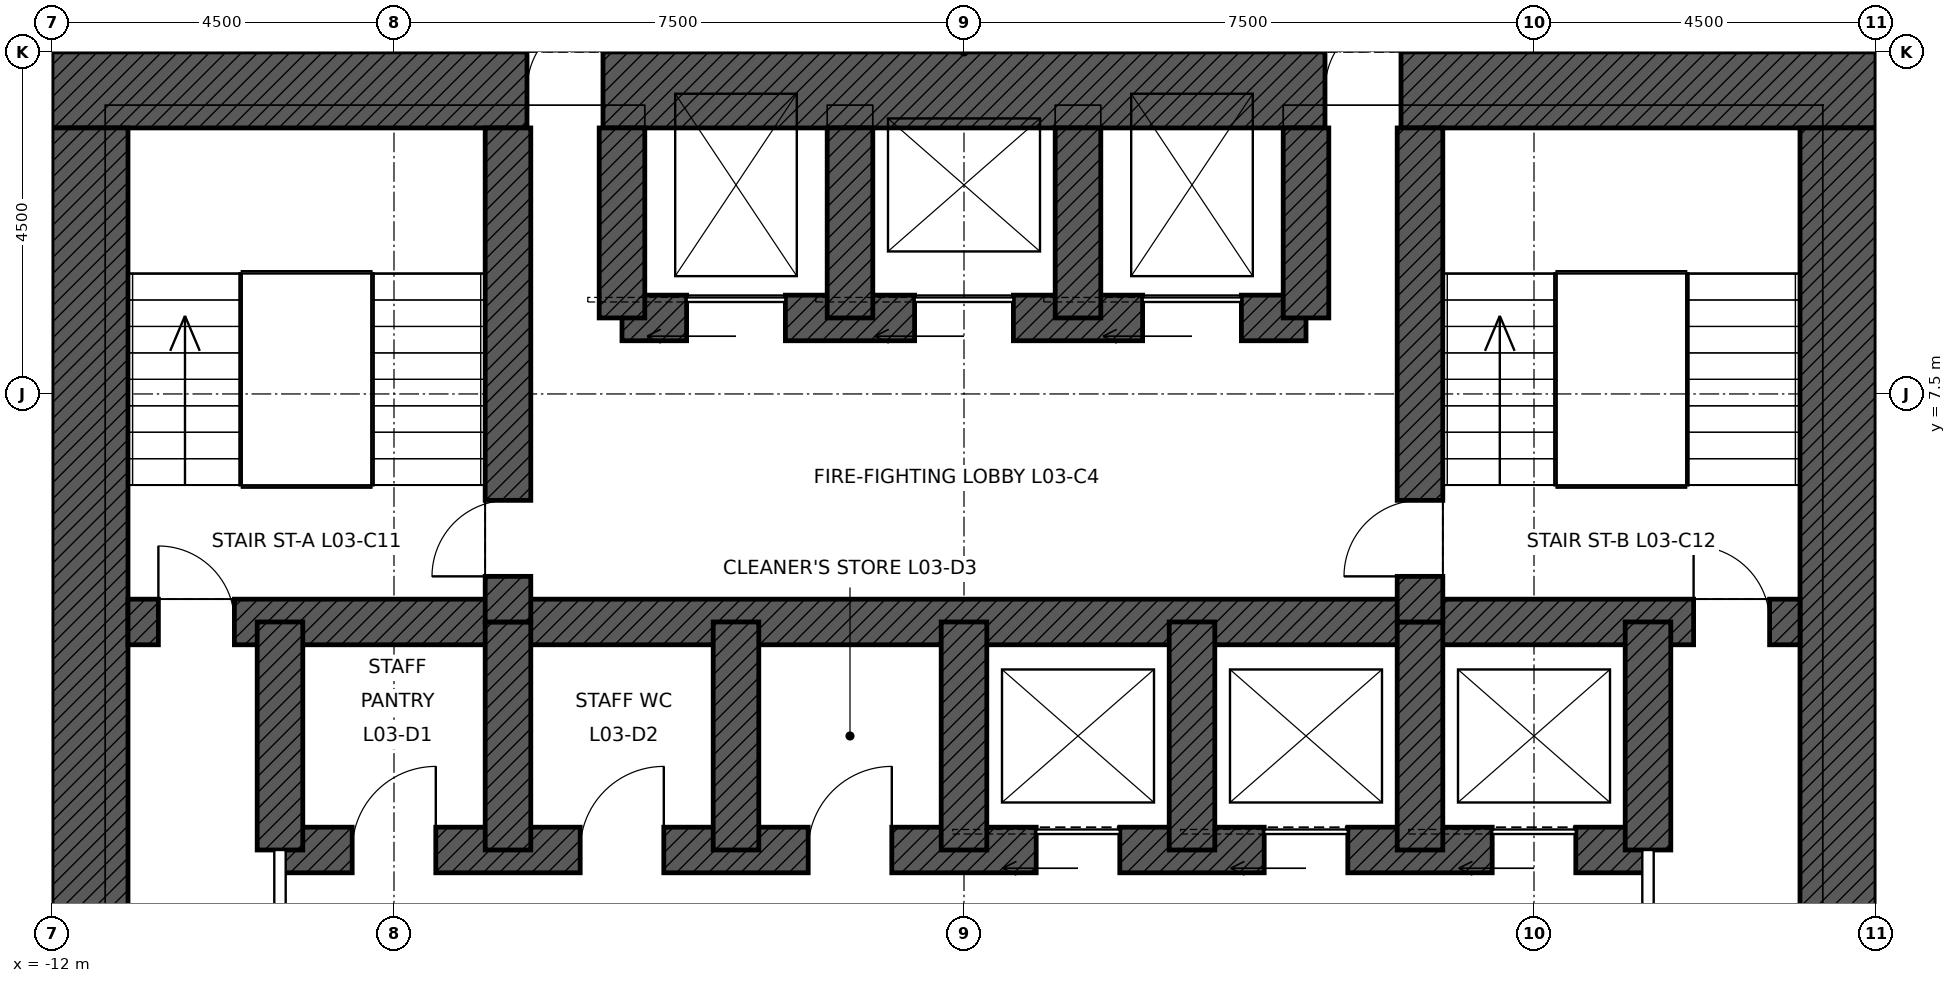
"""IFC4 building model, lengths in metres.
Left out: names, types, materials, properties, quantities, classifications, styles, units other than length and angle.
Written with IfcOpenShell. Run it as: python <this file> out.ifc"""

import sys

from ifc_helpers import new_model, si_unit, direction, frame, frame_2d, origin, place, context, subcontext, project, spatial, rectangle, extrude, element, fill, save


model = new_model("IFC4")
c1 = context("Model", 3, precision=1e-05, world=origin(), true_north=direction((0.0, 1.0)))
c2 = subcontext(c1, "Body", "Model", "MODEL_VIEW")
j1 = project(units=[si_unit("LENGTHUNIT", "METRE"), si_unit("PLANEANGLEUNIT", "RADIAN")], contexts=[c1])
p1 = place(None, origin())
s1 = spatial("IfcSite", under=j1, at=p1, CompositionType="ELEMENT")
p2 = place(p1, origin())
s2 = spatial("IfcBuilding", under=s1, at=p2, CompositionType="ELEMENT")
p3 = place(p2, frame((0.0, 0.0, 18.0)))
s3 = spatial("IfcBuildingStorey", under=s2, at=p3, CompositionType="ELEMENT", Elevation=18.0)
p4 = place(p3, frame((-12.0, 11.5, 0.0), z_axis=(0.0, 0.0, 1.0), x_axis=(1.0, 0.0, 0.0)))
e1 = element("IfcWall", 1, at=p4, inside=s3, PredefinedType="SHEAR", context=c2, shape_type="SweptSolid", body=[
    extrude(rectangle(XDim=24.0, YDim=1.0, at=frame_2d((12.0, 0.0))), origin(), (0.0, 0.0, 1.0), 5.4),
])
p5 = place(p4, frame((6.25, 0.0, 0.0)))
e2 = element("IfcOpeningElement", 2, at=p5, cuts=e1, PredefinedType="OPENING", context=c2, shape_type="SweptSolid", body=[
    extrude(rectangle(XDim=1.0, YDim=2.4, at=frame_2d((0.5, 1.2))), frame((0.0, 0.51, 0.0), z_axis=(0.0, -1.0, 0.0), x_axis=(1.0, 0.0, 0.0)), (0.0, 0.0, 1.0), 1.02),
])
p6 = place(p4, frame((16.75, 0.0, 0.0)))
e3 = element("IfcOpeningElement", 3, at=p6, cuts=e1, PredefinedType="OPENING", context=c2, shape_type="SweptSolid", body=[
    extrude(rectangle(XDim=1.0, YDim=2.4, at=frame_2d((0.5, 1.2))), frame((0.0, 0.51, 0.0), z_axis=(0.0, -1.0, 0.0), x_axis=(1.0, 0.0, 0.0)), (0.0, 0.0, 1.0), 1.02),
])
p7 = place(p3, frame((11.5, 11.0, 0.0), z_axis=(0.0, 0.0, 1.0), x_axis=(0.0, -1.0, 0.0)))
e4 = element("IfcWall", 4, at=p7, inside=s3, PredefinedType="SHEAR", context=c2, shape_type="SweptSolid", body=[
    extrude(rectangle(XDim=22.0, YDim=1.0, at=frame_2d((11.0, 0.0))), origin(), (0.0, 0.0, 1.0), 5.4),
])
p8 = place(p7, frame((10.5, 0.0, 0.0)))
e5 = element("IfcOpeningElement", 5, at=p8, cuts=e4, PredefinedType="OPENING", context=c2, shape_type="SweptSolid", body=[
    extrude(rectangle(XDim=1.0, YDim=2.4, at=frame_2d((0.5, 1.2))), frame((0.0, 0.51, 0.0), z_axis=(0.0, -1.0, 0.0), x_axis=(1.0, 0.0, 0.0)), (0.0, 0.0, 1.0), 1.02),
])
p9 = place(p3, frame((-11.5, -11.0, 0.0), z_axis=(0.0, 0.0, 1.0), x_axis=(0.0, 1.0, 0.0)))
e6 = element("IfcWall", 6, at=p9, inside=s3, PredefinedType="SHEAR", context=c2, shape_type="SweptSolid", body=[
    extrude(rectangle(XDim=22.0, YDim=1.0, at=frame_2d((11.0, 0.0))), origin(), (0.0, 0.0, 1.0), 5.4),
])
p10 = place(p9, frame((10.5, 0.0, 0.0)))
e7 = element("IfcOpeningElement", 7, at=p10, cuts=e6, PredefinedType="OPENING", context=c2, shape_type="SweptSolid", body=[
    extrude(rectangle(XDim=1.0, YDim=2.4, at=frame_2d((0.5, 1.2))), frame((0.0, 0.51, 0.0), z_axis=(0.0, -1.0, 0.0), x_axis=(1.0, 0.0, 0.0)), (0.0, 0.0, 1.0), 1.02),
])
p11 = place(p3, frame((-11.0, 4.5, 0.0), z_axis=(0.0, 0.0, 1.0), x_axis=(1.0, 0.0, 0.0)))
e8 = element("IfcWall", 8, at=p11, inside=s3, PredefinedType="SHEAR", context=c2, shape_type="SweptSolid", body=[
    extrude(rectangle(XDim=22.0, YDim=0.6, at=frame_2d((11.0, 0.0))), origin(), (0.0, 0.0, 1.0), 5.4),
])
p12 = place(p11, frame((0.4, 0.0, 0.0)))
e9 = element("IfcOpeningElement", 9, at=p12, cuts=e8, PredefinedType="OPENING", context=c2, shape_type="SweptSolid", body=[
    extrude(rectangle(XDim=1.0, YDim=2.1, at=frame_2d((0.5, 1.05))), frame((0.0, 0.31, 0.0), z_axis=(0.0, -1.0, 0.0), x_axis=(1.0, 0.0, 0.0)), (0.0, 0.0, 1.0), 0.62),
])
p13 = place(p11, frame((20.6, 0.0, 0.0)))
e10 = element("IfcOpeningElement", 10, at=p13, cuts=e8, PredefinedType="OPENING", context=c2, shape_type="SweptSolid", body=[
    extrude(rectangle(XDim=1.0, YDim=2.1, at=frame_2d((0.5, 1.05))), frame((0.0, 0.31, 0.0), z_axis=(0.0, -1.0, 0.0), x_axis=(1.0, 0.0, 0.0)), (0.0, 0.0, 1.0), 0.62),
])
p14 = place(p3, frame((-9.0, 1.5, 0.0), z_axis=(0.0, 0.0, 1.0), x_axis=(1.0, 0.0, 0.0)))
e11 = element("IfcWall", 11, at=p14, inside=s3, PredefinedType="SHEAR", context=c2, shape_type="SweptSolid", body=[
    extrude(rectangle(XDim=18.0, YDim=0.6, at=frame_2d((9.0, 0.0))), origin(), (0.0, 0.0, 1.0), 5.4),
])
p15 = place(p14, frame((9.95, 0.0, 0.0)))
e12 = element("IfcOpeningElement", 12, at=p15, cuts=e11, PredefinedType="OPENING", context=c2, shape_type="SweptSolid", body=[
    extrude(rectangle(XDim=1.1, YDim=2.1, at=frame_2d((0.55, 1.05))), frame((0.0, 0.31, 0.0), z_axis=(0.0, -1.0, 0.0), x_axis=(1.0, 0.0, 0.0)), (0.0, 0.0, 1.0), 0.62),
])
p16 = place(p14, frame((12.95, 0.0, 0.0)))
e13 = element("IfcOpeningElement", 13, at=p16, cuts=e11, PredefinedType="OPENING", context=c2, shape_type="SweptSolid", body=[
    extrude(rectangle(XDim=1.1, YDim=2.1, at=frame_2d((0.55, 1.05))), frame((0.0, 0.31, 0.0), z_axis=(0.0, -1.0, 0.0), x_axis=(1.0, 0.0, 0.0)), (0.0, 0.0, 1.0), 0.62),
])
p17 = place(p14, frame((15.95, 0.0, 0.0)))
e14 = element("IfcOpeningElement", 14, at=p17, cuts=e11, PredefinedType="OPENING", context=c2, shape_type="SweptSolid", body=[
    extrude(rectangle(XDim=1.1, YDim=2.1, at=frame_2d((0.55, 1.05))), frame((0.0, 0.31, 0.0), z_axis=(0.0, -1.0, 0.0), x_axis=(1.0, 0.0, 0.0)), (0.0, 0.0, 1.0), 0.62),
])
p18 = place(p14, frame((0.95, 0.0, 0.0)))
e15 = element("IfcOpeningElement", 15, at=p18, cuts=e11, PredefinedType="OPENING", context=c2, shape_type="SweptSolid", body=[
    extrude(rectangle(XDim=1.1, YDim=2.1, at=frame_2d((0.55, 1.05))), frame((0.0, 0.31, 0.0), z_axis=(0.0, -1.0, 0.0), x_axis=(1.0, 0.0, 0.0)), (0.0, 0.0, 1.0), 0.62),
])
p19 = place(p14, frame((3.95, 0.0, 0.0)))
e16 = element("IfcOpeningElement", 16, at=p19, cuts=e11, PredefinedType="OPENING", context=c2, shape_type="SweptSolid", body=[
    extrude(rectangle(XDim=1.1, YDim=2.1, at=frame_2d((0.55, 1.05))), frame((0.0, 0.31, 0.0), z_axis=(0.0, -1.0, 0.0), x_axis=(1.0, 0.0, 0.0)), (0.0, 0.0, 1.0), 0.62),
])
p20 = place(p14, frame((6.95, 0.0, 0.0)))
e17 = element("IfcOpeningElement", 17, at=p20, cuts=e11, PredefinedType="OPENING", context=c2, shape_type="SweptSolid", body=[
    extrude(rectangle(XDim=1.1, YDim=2.1, at=frame_2d((0.55, 1.05))), frame((0.0, 0.31, 0.0), z_axis=(0.0, -1.0, 0.0), x_axis=(1.0, 0.0, 0.0)), (0.0, 0.0, 1.0), 0.62),
])
p21 = place(p3, frame((-4.5, 8.5, 0.0), z_axis=(0.0, 0.0, 1.0), x_axis=(1.0, 0.0, 0.0)))
e18 = element("IfcWall", 18, at=p21, inside=s3, PredefinedType="SHEAR", context=c2, shape_type="SweptSolid", body=[
    extrude(rectangle(XDim=9.0, YDim=0.6, at=frame_2d((4.5, 0.0))), origin(), (0.0, 0.0, 1.0), 5.4),
])
p22 = place(p21, frame((0.85, 0.0, 0.0)))
e19 = element("IfcOpeningElement", 19, at=p22, cuts=e18, PredefinedType="OPENING", context=c2, shape_type="SweptSolid", body=[
    extrude(rectangle(XDim=1.3, YDim=2.4, at=frame_2d((0.65, 1.2))), frame((0.0, 0.31, 0.0), z_axis=(0.0, -1.0, 0.0), x_axis=(1.0, 0.0, 0.0)), (0.0, 0.0, 1.0), 0.62),
])
p23 = place(p21, frame((6.85, 0.0, 0.0)))
e20 = element("IfcOpeningElement", 20, at=p23, cuts=e18, PredefinedType="OPENING", context=c2, shape_type="SweptSolid", body=[
    extrude(rectangle(XDim=1.3, YDim=2.4, at=frame_2d((0.65, 1.2))), frame((0.0, 0.31, 0.0), z_axis=(0.0, -1.0, 0.0), x_axis=(1.0, 0.0, 0.0)), (0.0, 0.0, 1.0), 0.62),
])
p24 = place(p21, frame((3.85, 0.0, 0.0)))
e21 = element("IfcOpeningElement", 21, at=p24, cuts=e18, PredefinedType="OPENING", context=c2, shape_type="SweptSolid", body=[
    extrude(rectangle(XDim=1.3, YDim=2.4, at=frame_2d((0.65, 1.2))), frame((0.0, 0.31, 0.0), z_axis=(0.0, -1.0, 0.0), x_axis=(1.0, 0.0, 0.0)), (0.0, 0.0, 1.0), 0.62),
])
for number, where, z_axis, x_axis in (
    (22, (-9.0, 1.5, 0.0), (0.0, 0.0, 1.0), (0.0, 1.0, 0.0)),
    (23, (9.0, 1.5, 0.0), (0.0, 0.0, 1.0), (0.0, 1.0, 0.0)),
    (24, (-6.0, 1.5, 0.0), (0.0, 0.0, 1.0), (0.0, 1.0, 0.0)),
    (25, (-3.0, 1.5, 0.0), (0.0, 0.0, 1.0), (0.0, 1.0, 0.0)),
    (26, (0.0, 1.5, 0.0), (0.0, 0.0, 1.0), (0.0, 1.0, 0.0)),
    (27, (3.0, 1.5, 0.0), (0.0, 0.0, 1.0), (0.0, 1.0, 0.0)),
    (28, (6.0, 1.5, 0.0), (0.0, 0.0, 1.0), (0.0, 1.0, 0.0)),
):
    element("IfcWall", number, at=place(p3, frame(where, z_axis=z_axis, x_axis=x_axis)), inside=s3, PredefinedType="SHEAR", context=c2, shape_type="SweptSolid", body=[
        extrude(rectangle(XDim=3.0, YDim=0.6, at=frame_2d((1.5, 0.0))), origin(), (0.0, 0.0, 1.0), 5.4),
    ])
p25 = place(p3, frame((-6.0, 4.5, 0.0), z_axis=(0.0, 0.0, 1.0), x_axis=(0.0, 1.0, 0.0)))
e29 = element("IfcWall", 29, at=p25, inside=s3, PredefinedType="SHEAR", context=c2, shape_type="SweptSolid", body=[
    extrude(rectangle(XDim=6.5, YDim=0.6, at=frame_2d((3.25, 0.0))), origin(), (0.0, 0.0, 1.0), 5.4),
])
p26 = place(p25, frame((0.6, 0.0, 0.0)))
e30 = element("IfcOpeningElement", 30, at=p26, cuts=e29, PredefinedType="OPENING", context=c2, shape_type="SweptSolid", body=[
    extrude(rectangle(XDim=1.0, YDim=2.1, at=frame_2d((0.5, 1.05))), frame((0.0, 0.31, 0.0), z_axis=(0.0, -1.0, 0.0), x_axis=(1.0, 0.0, 0.0)), (0.0, 0.0, 1.0), 0.62),
])
p27 = place(p3, frame((6.0, 4.5, 0.0), z_axis=(0.0, 0.0, 1.0), x_axis=(0.0, 1.0, 0.0)))
e31 = element("IfcWall", 31, at=p27, inside=s3, PredefinedType="SHEAR", context=c2, shape_type="SweptSolid", body=[
    extrude(rectangle(XDim=6.5, YDim=0.6, at=frame_2d((3.25, 0.0))), origin(), (0.0, 0.0, 1.0), 5.4),
])
p28 = place(p27, frame((0.6, 0.0, 0.0)))
e32 = element("IfcOpeningElement", 32, at=p28, cuts=e31, PredefinedType="OPENING", context=c2, shape_type="SweptSolid", body=[
    extrude(rectangle(XDim=1.0, YDim=2.1, at=frame_2d((0.5, 1.05))), frame((0.0, 0.31, 0.0), z_axis=(0.0, -1.0, 0.0), x_axis=(1.0, 0.0, 0.0)), (0.0, 0.0, 1.0), 0.62),
])
for number, where, z_axis, x_axis in (
    (33, (-4.5, 8.5, 0.0), (0.0, 0.0, 1.0), (0.0, 1.0, 0.0)),
    (34, (4.5, 8.5, 0.0), (0.0, 0.0, 1.0), (0.0, 1.0, 0.0)),
    (35, (-1.5, 8.5, 0.0), (0.0, 0.0, 1.0), (0.0, 1.0, 0.0)),
    (36, (1.5, 8.5, 0.0), (0.0, 0.0, 1.0), (0.0, 1.0, 0.0)),
):
    element("IfcWall", number, at=place(p3, frame(where, z_axis=z_axis, x_axis=x_axis)), inside=s3, PredefinedType="SHEAR", context=c2, shape_type="SweptSolid", body=[
        extrude(rectangle(XDim=2.5, YDim=0.6, at=frame_2d((1.25, 0.0))), origin(), (0.0, 0.0, 1.0), 5.4),
    ])
p29 = place(p3, frame((-9.0, -1.5, 0.0), z_axis=(0.0, 0.0, 1.0), x_axis=(0.0, 1.0, 0.0)))
e37 = element("IfcWall", 37, at=p29, inside=s3, PredefinedType="PARTITIONING", context=c2, shape_type="SweptSolid", body=[
    extrude(rectangle(XDim=3.0, YDim=0.15, at=frame_2d((1.5, 0.0))), origin(), (0.0, 0.0, 1.0), 5.15),
])
p30 = place(p29, frame((1.0, 0.0, 0.0)))
e38 = element("IfcOpeningElement", 38, at=p30, cuts=e37, PredefinedType="OPENING", context=c2, shape_type="SweptSolid", body=[
    extrude(rectangle(XDim=1.0, YDim=2.4, at=frame_2d((0.5, 1.2))), frame((0.0, 0.085, 0.0), z_axis=(0.0, -1.0, 0.0), x_axis=(1.0, 0.0, 0.0)), (0.0, 0.0, 1.0), 0.17),
])
p31 = place(p3, frame((9.0, -1.5, 0.0), z_axis=(0.0, 0.0, 1.0), x_axis=(0.0, 1.0, 0.0)))
e39 = element("IfcWall", 39, at=p31, inside=s3, PredefinedType="PARTITIONING", context=c2, shape_type="SweptSolid", body=[
    extrude(rectangle(XDim=3.0, YDim=0.15, at=frame_2d((1.5, 0.0))), origin(), (0.0, 0.0, 1.0), 5.15),
])
p32 = place(p31, frame((1.0, 0.0, 0.0)))
e40 = element("IfcOpeningElement", 40, at=p32, cuts=e39, PredefinedType="OPENING", context=c2, shape_type="SweptSolid", body=[
    extrude(rectangle(XDim=1.0, YDim=2.4, at=frame_2d((0.5, 1.2))), frame((0.0, 0.085, 0.0), z_axis=(0.0, -1.0, 0.0), x_axis=(1.0, 0.0, 0.0)), (0.0, 0.0, 1.0), 0.17),
])
p33 = place(p12, origin())
e41 = element("IfcDoor", 41, at=p33, inside=s3, OperationType="SINGLE_SWING_LEFT", PredefinedType="DOOR", context=c2, shape_type="SweptSolid", body=[
    extrude(rectangle(XDim=1.0, YDim=2.1, at=frame_2d((0.5, 1.05))), frame((0.0, 0.025, 0.0), z_axis=(0.0, -1.0, 0.0), x_axis=(1.0, 0.0, 0.0)), (0.0, 0.0, 1.0), 0.05),
])
fill(e9, e41)
p34 = place(p13, origin())
e42 = element("IfcDoor", 42, at=p34, inside=s3, OperationType="SINGLE_SWING_LEFT", PredefinedType="DOOR", context=c2, shape_type="SweptSolid", body=[
    extrude(rectangle(XDim=1.0, YDim=2.1, at=frame_2d((0.5, 1.05))), frame((0.0, 0.025, 0.0), z_axis=(0.0, -1.0, 0.0), x_axis=(1.0, 0.0, 0.0)), (0.0, 0.0, 1.0), 0.05),
])
fill(e10, e42)
p35 = place(p26, origin())
e43 = element("IfcDoor", 43, at=p35, inside=s3, OperationType="SINGLE_SWING_LEFT", PredefinedType="DOOR", context=c2, shape_type="SweptSolid", body=[
    extrude(rectangle(XDim=1.0, YDim=2.1, at=frame_2d((0.5, 1.05))), frame((0.0, 0.025, 0.0), z_axis=(0.0, -1.0, 0.0), x_axis=(1.0, 0.0, 0.0)), (0.0, 0.0, 1.0), 0.05),
])
fill(e30, e43)
p36 = place(p28, origin())
e44 = element("IfcDoor", 44, at=p36, inside=s3, OperationType="SINGLE_SWING_LEFT", PredefinedType="DOOR", context=c2, shape_type="SweptSolid", body=[
    extrude(rectangle(XDim=1.0, YDim=2.1, at=frame_2d((0.5, 1.05))), frame((0.0, 0.025, 0.0), z_axis=(0.0, -1.0, 0.0), x_axis=(1.0, 0.0, 0.0)), (0.0, 0.0, 1.0), 0.05),
])
fill(e32, e44)
p37 = place(p5, origin())
e45 = element("IfcDoor", 45, at=p37, inside=s3, OperationType="SINGLE_SWING_RIGHT", PredefinedType="DOOR", context=c2, shape_type="SweptSolid", body=[
    extrude(rectangle(XDim=1.0, YDim=2.4, at=frame_2d((0.5, 1.2))), frame((0.0, 0.485, 0.0), z_axis=(0.0, -1.0, 0.0), x_axis=(1.0, 0.0, 0.0)), (0.0, 0.0, 1.0), 0.05),
])
fill(e2, e45)
p38 = place(p6, origin())
e46 = element("IfcDoor", 46, at=p38, inside=s3, OperationType="SINGLE_SWING_RIGHT", PredefinedType="DOOR", context=c2, shape_type="SweptSolid", body=[
    extrude(rectangle(XDim=1.0, YDim=2.4, at=frame_2d((0.5, 1.2))), frame((0.0, 0.485, 0.0), z_axis=(0.0, -1.0, 0.0), x_axis=(1.0, 0.0, 0.0)), (0.0, 0.0, 1.0), 0.05),
])
fill(e3, e46)
p39 = place(p22, origin())
e47 = element("IfcDoor", 47, at=p39, inside=s3, OperationType="SLIDING_TO_LEFT", PredefinedType="DOOR", context=c2, shape_type="SweptSolid", body=[
    extrude(rectangle(XDim=1.3, YDim=2.4, at=frame_2d((0.65, 1.2))), frame((0.0, 0.025, 0.0), z_axis=(0.0, -1.0, 0.0), x_axis=(1.0, 0.0, 0.0)), (0.0, 0.0, 1.0), 0.05),
])
fill(e19, e47)
p40 = place(p23, origin())
e48 = element("IfcDoor", 48, at=p40, inside=s3, OperationType="SLIDING_TO_LEFT", PredefinedType="DOOR", context=c2, shape_type="SweptSolid", body=[
    extrude(rectangle(XDim=1.3, YDim=2.4, at=frame_2d((0.65, 1.2))), frame((0.0, 0.025, 0.0), z_axis=(0.0, -1.0, 0.0), x_axis=(1.0, 0.0, 0.0)), (0.0, 0.0, 1.0), 0.05),
])
fill(e20, e48)
p41 = place(p24, origin())
e49 = element("IfcDoor", 49, at=p41, inside=s3, OperationType="SLIDING_TO_LEFT", PredefinedType="DOOR", context=c2, shape_type="SweptSolid", body=[
    extrude(rectangle(XDim=1.3, YDim=2.4, at=frame_2d((0.65, 1.2))), frame((0.0, 0.025, 0.0), z_axis=(0.0, -1.0, 0.0), x_axis=(1.0, 0.0, 0.0)), (0.0, 0.0, 1.0), 0.05),
])
fill(e21, e49)
p42 = place(p15, origin())
e50 = element("IfcDoor", 50, at=p42, inside=s3, OperationType="SLIDING_TO_LEFT", PredefinedType="DOOR", context=c2, shape_type="SweptSolid", body=[
    extrude(rectangle(XDim=1.1, YDim=2.1, at=frame_2d((0.55, 1.05))), frame((0.0, 0.025, 0.0), z_axis=(0.0, -1.0, 0.0), x_axis=(1.0, 0.0, 0.0)), (0.0, 0.0, 1.0), 0.05),
])
fill(e12, e50)
p43 = place(p16, origin())
e51 = element("IfcDoor", 51, at=p43, inside=s3, OperationType="SLIDING_TO_LEFT", PredefinedType="DOOR", context=c2, shape_type="SweptSolid", body=[
    extrude(rectangle(XDim=1.1, YDim=2.1, at=frame_2d((0.55, 1.05))), frame((0.0, 0.025, 0.0), z_axis=(0.0, -1.0, 0.0), x_axis=(1.0, 0.0, 0.0)), (0.0, 0.0, 1.0), 0.05),
])
fill(e13, e51)
p44 = place(p17, origin())
e52 = element("IfcDoor", 52, at=p44, inside=s3, OperationType="SLIDING_TO_LEFT", PredefinedType="DOOR", context=c2, shape_type="SweptSolid", body=[
    extrude(rectangle(XDim=1.1, YDim=2.1, at=frame_2d((0.55, 1.05))), frame((0.0, 0.025, 0.0), z_axis=(0.0, -1.0, 0.0), x_axis=(1.0, 0.0, 0.0)), (0.0, 0.0, 1.0), 0.05),
])
fill(e14, e52)
p45 = place(p18, origin())
e53 = element("IfcDoor", 53, at=p45, inside=s3, OperationType="SINGLE_SWING_RIGHT", PredefinedType="DOOR", context=c2, shape_type="SweptSolid", body=[
    extrude(rectangle(XDim=1.1, YDim=2.1, at=frame_2d((0.55, 1.05))), frame((0.0, 0.025, 0.0), z_axis=(0.0, -1.0, 0.0), x_axis=(1.0, 0.0, 0.0)), (0.0, 0.0, 1.0), 0.05),
])
fill(e15, e53)
p46 = place(p19, origin())
e54 = element("IfcDoor", 54, at=p46, inside=s3, OperationType="SINGLE_SWING_RIGHT", PredefinedType="DOOR", context=c2, shape_type="SweptSolid", body=[
    extrude(rectangle(XDim=1.1, YDim=2.1, at=frame_2d((0.55, 1.05))), frame((0.0, 0.025, 0.0), z_axis=(0.0, -1.0, 0.0), x_axis=(1.0, 0.0, 0.0)), (0.0, 0.0, 1.0), 0.05),
])
fill(e16, e54)
p47 = place(p20, origin())
e55 = element("IfcDoor", 55, at=p47, inside=s3, OperationType="SINGLE_SWING_RIGHT", PredefinedType="DOOR", context=c2, shape_type="SweptSolid", body=[
    extrude(rectangle(XDim=1.1, YDim=2.1, at=frame_2d((0.55, 1.05))), frame((0.0, 0.025, 0.0), z_axis=(0.0, -1.0, 0.0), x_axis=(1.0, 0.0, 0.0)), (0.0, 0.0, 1.0), 0.05),
])
fill(e17, e55)
save(model, sys.argv[1])
